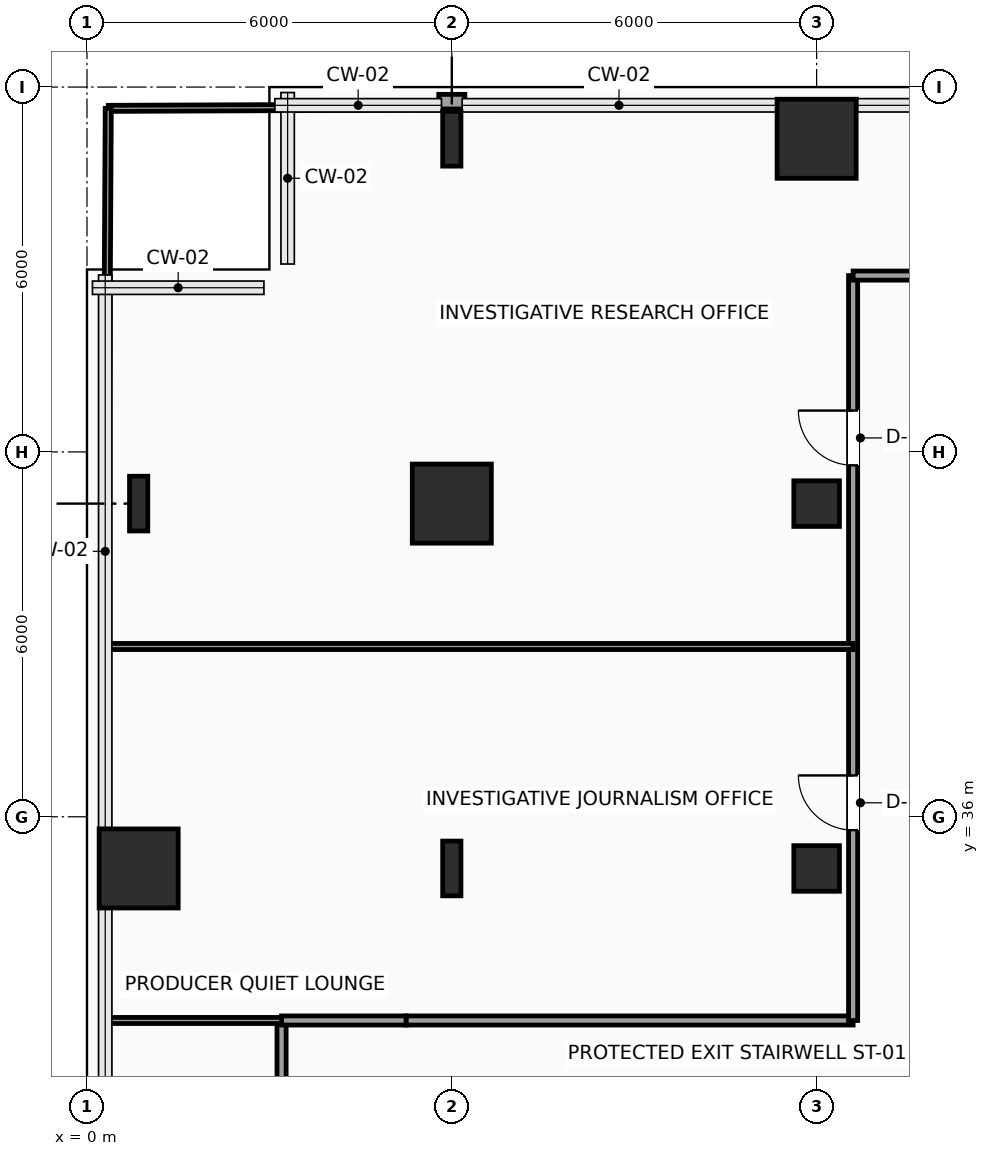
"""IFC4 building model, lengths in metres.
Left out: names, types, materials, properties, quantities, classifications, styles, units other than length and angle.
Written with IfcOpenShell. Run it as: python <this file> out.ifc"""

import sys

from ifc_helpers import new_model, si_unit, direction, frame, frame_2d, origin, origin_2d, place, context, subcontext, project, spatial, rectangle, hollow_rectangle, i_section, extrude, element, fill, save


model = new_model("IFC4")
c1 = context("Model", 3, precision=1e-05, world=origin(), true_north=direction((0.0, 1.0)))
c2 = subcontext(c1, "Body", "Model", "MODEL_VIEW")
j1 = project(units=[si_unit("LENGTHUNIT", "METRE"), si_unit("PLANEANGLEUNIT", "RADIAN")], contexts=[c1])
p1 = place(None, origin())
s1 = spatial("IfcSite", under=j1, at=p1, CompositionType="ELEMENT")
p2 = place(p1, origin())
s2 = spatial("IfcBuilding", under=s1, at=p2, CompositionType="ELEMENT")
p3 = place(p2, frame((0.0, 0.0, 32.4)))
s3 = spatial("IfcBuildingStorey", under=s2, at=p3, CompositionType="ELEMENT", Elevation=32.4)
p4 = place(p3, frame((0.85, 35.15, 0.0), z_axis=(0.0, 0.0, 1.0), x_axis=(1.0, 0.0, 0.0)))
e1 = element("IfcColumn", 1, at=p4, inside=s3, PredefinedType="COLUMN", context=c2, shape_type="SweptSolid", body=[
    extrude(rectangle(XDim=1.3, YDim=1.3, at=origin_2d()), origin(), (0.0, 0.0, 1.0), 3.9),
])
for number, where, z_axis, x_axis in (
    (2, (0.85, 41.15, 0.0), (0.0, 0.0, 1.0), (1.0, 0.0, 0.0)),
    (3, (6.0, 35.15, 0.0), (0.0, 0.0, 1.0), (1.0, 0.0, 0.0)),
):
    element("IfcColumn", number, at=place(p3, frame(where, z_axis=z_axis, x_axis=x_axis)), inside=s3, PredefinedType="COLUMN", context=c2, shape_type="SweptSolid", body=[
        extrude(i_section(OverallWidth=0.3, OverallDepth=0.9, WebThickness=0.019, FlangeThickness=0.035, FilletRadius=0.03, at=origin_2d()), origin(), (0.0, 0.0, 1.0), 3.9),
    ])
p5 = place(p3, frame((6.0, 41.15, 0.0), z_axis=(0.0, 0.0, 1.0), x_axis=(1.0, 0.0, 0.0)))
e4 = element("IfcColumn", 4, at=p5, inside=s3, PredefinedType="COLUMN", context=c2, shape_type="SweptSolid", body=[
    extrude(rectangle(XDim=1.3, YDim=1.3, at=origin_2d()), origin(), (0.0, 0.0, 1.0), 3.9),
])
p6 = place(p3, frame((6.0, 47.15, 0.0), z_axis=(0.0, 0.0, 1.0), x_axis=(1.0, 0.0, 0.0)))
e5 = element("IfcColumn", 5, at=p6, inside=s3, PredefinedType="COLUMN", context=c2, shape_type="SweptSolid", body=[
    extrude(i_section(OverallWidth=0.3, OverallDepth=0.9, WebThickness=0.019, FlangeThickness=0.035, FilletRadius=0.03, at=origin_2d()), origin(), (0.0, 0.0, 1.0), 3.9),
])
for number, where, z_axis, x_axis in (
    (6, (12.0, 35.15, 0.0), (0.0, 0.0, 1.0), (1.0, 0.0, 0.0)),
    (7, (12.0, 41.15, 0.0), (0.0, 0.0, 1.0), (1.0, 0.0, 0.0)),
):
    element("IfcColumn", number, at=place(p3, frame(where, z_axis=z_axis, x_axis=x_axis)), inside=s3, PredefinedType="COLUMN", context=c2, shape_type="SweptSolid", body=[
        extrude(hollow_rectangle(XDim=0.75, YDim=0.75, WallThickness=0.035, InnerFilletRadius=0.035, OuterFilletRadius=0.05, at=origin_2d()), origin(), (0.0, 0.0, 1.0), 3.9),
    ])
p7 = place(p3, frame((12.0, 47.15, 0.0), z_axis=(0.0, 0.0, 1.0), x_axis=(1.0, 0.0, 0.0)))
e8 = element("IfcColumn", 8, at=p7, inside=s3, PredefinedType="COLUMN", context=c2, shape_type="SweptSolid", body=[
    extrude(rectangle(XDim=1.3, YDim=1.3, at=origin_2d()), origin(), (0.0, 0.0, 1.0), 3.9),
])
p8 = place(p3, frame((5.785, 47.76, 0.0), z_axis=(0.0, 0.0, 1.0), x_axis=(1.0, 0.0, 0.0)))
e9 = element("IfcWall", 9, at=p8, inside=s3, PredefinedType="SOLIDWALL", context=c2, shape_type="SweptSolid", body=[
    extrude(rectangle(XDim=0.43, YDim=0.24, at=frame_2d((0.215, 0.0))), origin(), (0.0, 0.0, 1.0), 3.65),
])
p9 = place(p3, frame((3.2, 30.25, 0.0), z_axis=(0.0, 0.0, 1.0), x_axis=(0.0, 1.0, 0.0)))
e10 = element("IfcWall", 10, at=p9, inside=s3, PredefinedType="PARTITIONING", context=c2, shape_type="SweptSolid", body=[
    extrude(rectangle(XDim=2.4, YDim=0.15, at=frame_2d((1.2, 0.0))), origin(), (0.0, 0.0, 1.0), 3.65),
])
p10 = place(p3, frame((3.2, 32.65, 0.0), z_axis=(0.0, 0.0, 1.0), x_axis=(1.0, 0.0, 0.0)))
e11 = element("IfcWall", 11, at=p10, inside=s3, PredefinedType="PARTITIONING", context=c2, shape_type="SweptSolid", body=[
    extrude(rectangle(XDim=2.05, YDim=0.15, at=frame_2d((1.025, 0.0))), origin(), (0.0, 0.0, 1.0), 3.65),
])
p11 = place(p3, frame((5.25, 32.65, 0.0), z_axis=(0.0, 0.0, 1.0), x_axis=(1.0, 0.0, 0.0)))
e12 = element("IfcWall", 12, at=p11, inside=s3, PredefinedType="PARTITIONING", context=c2, shape_type="SweptSolid", body=[
    extrude(rectangle(XDim=7.35, YDim=0.15, at=frame_2d((3.675, 0.0))), origin(), (0.0, 0.0, 1.0), 3.65),
])
p12 = place(p3, frame((12.6, 32.65, 0.0), z_axis=(0.0, 0.0, 1.0), x_axis=(0.0, 1.0, 0.0)))
e13 = element("IfcWall", 13, at=p12, inside=s3, PredefinedType="PARTITIONING", context=c2, shape_type="SweptSolid", body=[
    extrude(rectangle(XDim=12.25, YDim=0.15, at=frame_2d((6.125, 0.0))), origin(), (0.0, 0.0, 1.0), 3.65),
])
p13 = place(p12, frame((3.13, 0.0, 0.0)))
e14 = element("IfcOpeningElement", 14, at=p13, cuts=e13, PredefinedType="OPENING", context=c2, shape_type="SweptSolid", body=[
    extrude(rectangle(XDim=0.9, YDim=2.1, at=frame_2d((0.45, 1.05))), frame((0.0, 0.085, 0.0), z_axis=(0.0, -1.0, 0.0), x_axis=(1.0, 0.0, 0.0)), (0.0, 0.0, 1.0), 0.17),
])
p14 = place(p12, frame((9.13, 0.0, 0.0)))
e15 = element("IfcOpeningElement", 15, at=p14, cuts=e13, PredefinedType="OPENING", context=c2, shape_type="SweptSolid", body=[
    extrude(rectangle(XDim=0.9, YDim=2.1, at=frame_2d((0.45, 1.05))), frame((0.0, 0.085, 0.0), z_axis=(0.0, -1.0, 0.0), x_axis=(1.0, 0.0, 0.0)), (0.0, 0.0, 1.0), 0.17),
])
p15 = place(p3, frame((12.6, 44.9, 0.0), z_axis=(0.0, 0.0, 1.0), x_axis=(1.0, 0.0, 0.0)))
e16 = element("IfcWall", 16, at=p15, inside=s3, PredefinedType="PARTITIONING", context=c2, shape_type="SweptSolid", body=[
    extrude(rectangle(XDim=2.35, YDim=0.15, at=frame_2d((1.175, 0.0))), origin(), (0.0, 0.0, 1.0), 3.65),
])
p16 = place(p3, frame((0.3, 38.8, 0.0), z_axis=(0.0, 0.0, 1.0), x_axis=(1.0, 0.0, 0.0)))
e17 = element("IfcWall", 17, at=p16, inside=s3, PredefinedType="PARTITIONING", context=c2, shape_type="SweptSolid", body=[
    extrude(rectangle(XDim=12.3, YDim=0.1, at=frame_2d((6.15, 0.0))), origin(), (0.0, 0.0, 1.0), 3.65),
])
p17 = place(p3, frame((0.35, 47.65, 0.0), z_axis=(0.0, 0.0, 1.0), x_axis=(0.999991644778, 0.004087832518, 0.0)))
e18 = element("IfcWall", 18, at=p17, inside=s3, PredefinedType="PARTITIONING", context=c2, shape_type="SweptSolid", body=[
    extrude(rectangle(XDim=5.435, YDim=0.1, at=frame_2d((2.717, 0.0))), origin(), (0.0, 0.0, 1.0), 3.65),
])
p18 = place(p3, frame((6.215, 47.674, 0.0), z_axis=(0.0, 0.0, 1.0), x_axis=(0.999991630701, 0.004091274595, 0.0)))
e19 = element("IfcWall", 19, at=p18, inside=s3, PredefinedType="PARTITIONING", context=c2, shape_type="SweptSolid", body=[
    extrude(rectangle(XDim=6.385, YDim=0.1, at=frame_2d((3.192, 0.0))), origin(), (0.0, 0.0, 1.0), 3.65),
])
p19 = place(p3, frame((0.3, 38.8, 0.0), z_axis=(0.0, 0.0, 1.0), x_axis=(0.005655237989, 0.999984009014, 0.0)))
e20 = element("IfcWall", 20, at=p19, inside=s3, PredefinedType="PARTITIONING", context=c2, shape_type="SweptSolid", body=[
    extrude(rectangle(XDim=8.85, YDim=0.1, at=frame_2d((4.425, 0.0))), origin(), (0.0, 0.0, 1.0), 3.65),
])
p20 = place(p3, frame((0.3, 32.65, 0.0), z_axis=(0.0, 0.0, 1.0), x_axis=(1.0, 0.0, 0.0)))
e21 = element("IfcWall", 21, at=p20, inside=s3, PredefinedType="PARTITIONING", context=c2, shape_type="SweptSolid", body=[
    extrude(rectangle(XDim=2.9, YDim=0.1, at=frame_2d((1.45, 0.0))), origin(), (0.0, 0.0, 1.0), 3.65),
])
p21 = place(p13, origin())
e22 = element("IfcDoor", 22, at=p21, inside=s3, OperationType="SINGLE_SWING_RIGHT", PredefinedType="DOOR", context=c2, shape_type="SweptSolid", body=[
    extrude(rectangle(XDim=0.9, YDim=2.1, at=frame_2d((0.45, 1.05))), frame((0.0, 0.025, 0.0), z_axis=(0.0, -1.0, 0.0), x_axis=(1.0, 0.0, 0.0)), (0.0, 0.0, 1.0), 0.05),
])
fill(e14, e22)
p22 = place(p14, origin())
e23 = element("IfcDoor", 23, at=p22, inside=s3, OperationType="SINGLE_SWING_RIGHT", PredefinedType="DOOR", context=c2, shape_type="SweptSolid", body=[
    extrude(rectangle(XDim=0.9, YDim=2.1, at=frame_2d((0.45, 1.05))), frame((0.0, 0.025, 0.0), z_axis=(0.0, -1.0, 0.0), x_axis=(1.0, 0.0, 0.0)), (0.0, 0.0, 1.0), 0.05),
])
fill(e15, e23)
save(model, sys.argv[1])
